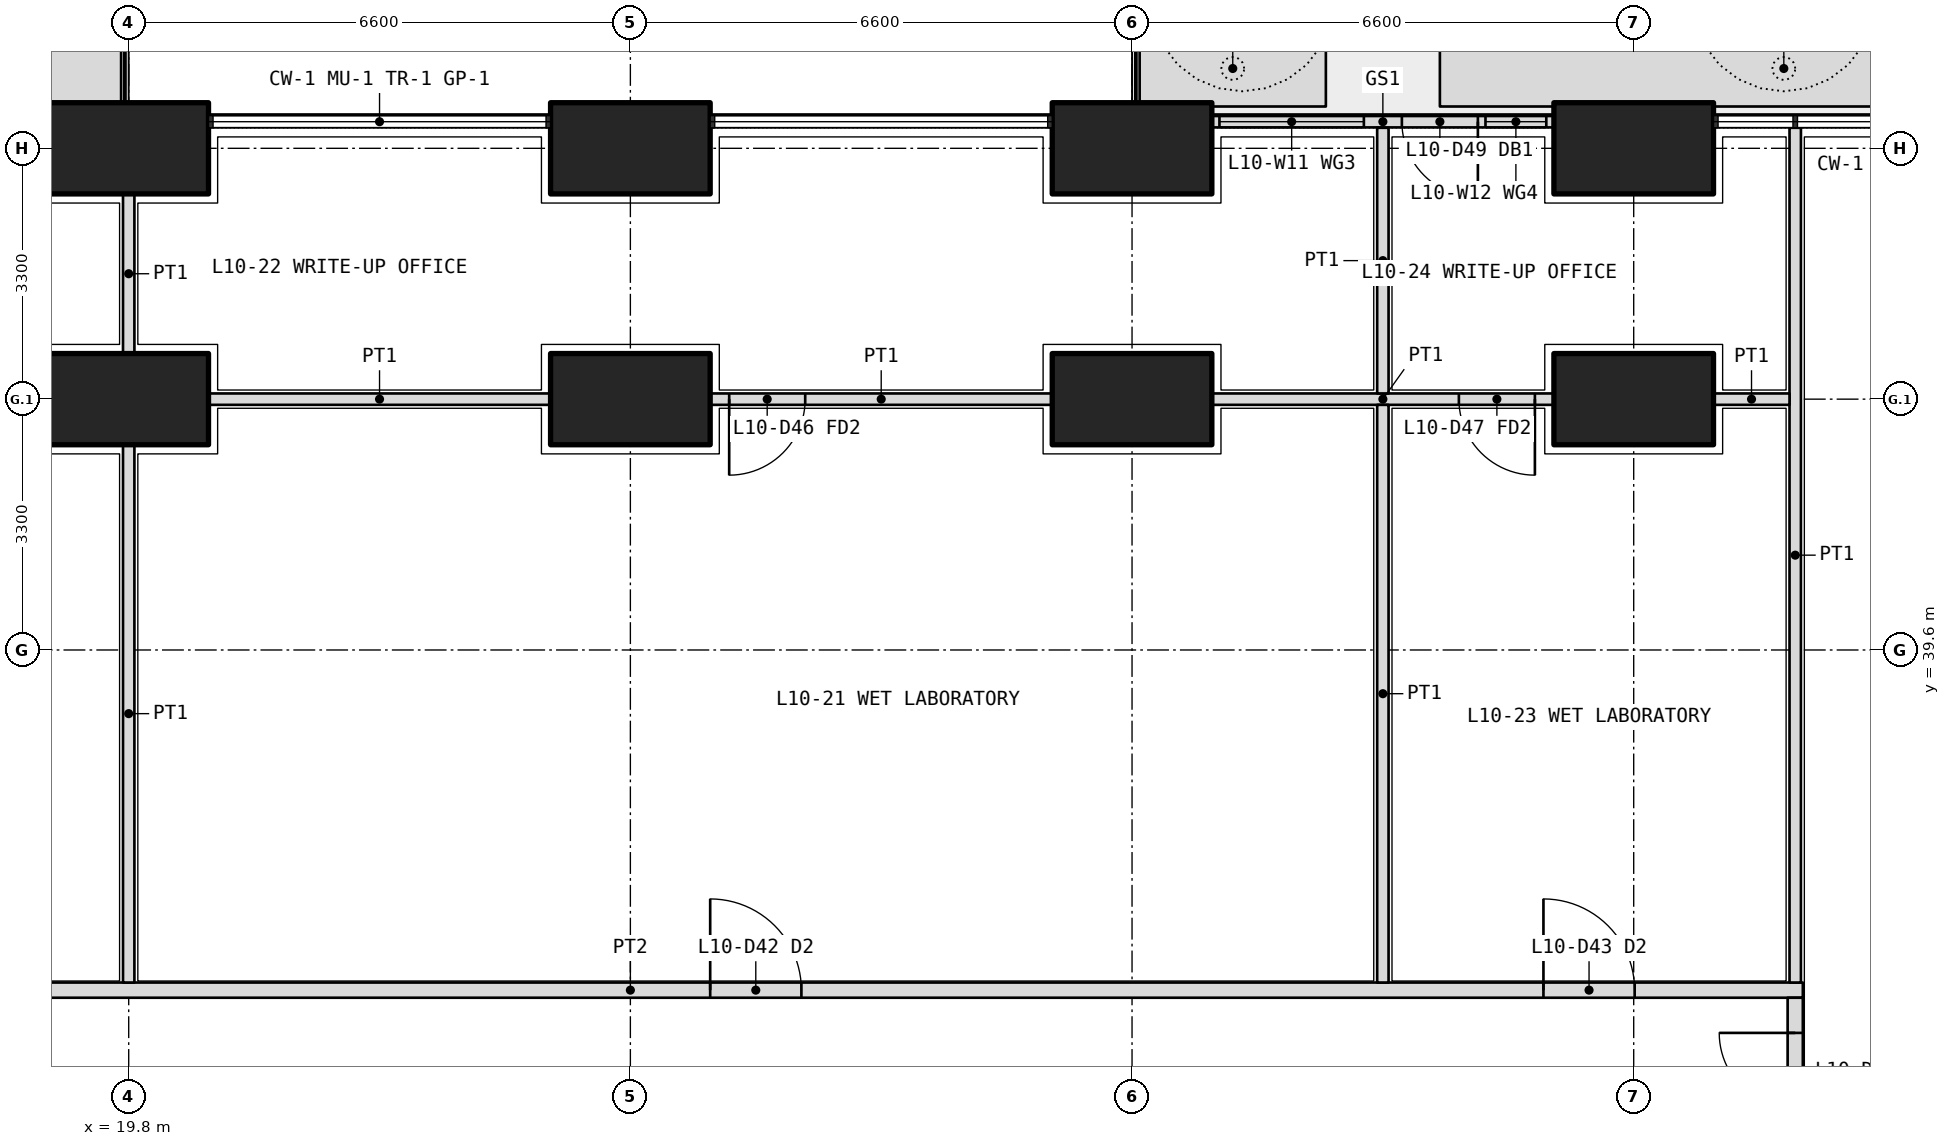
"""IFC4 building model, lengths in metres.
Left out: names, types, materials, properties, quantities, classifications, styles, units other than length and angle.
Written with IfcOpenShell. Run it as: python <this file> out.ifc"""

import sys

from ifc_helpers import new_model, si_unit, direction, frame, frame_2d, origin, origin_2d, place, context, subcontext, project, spatial, polyline, rectangle, outline, extrude, element, fill, save


model = new_model("IFC4")
c1 = context("Model", 3, precision=1e-05, world=origin(), true_north=direction((0.0, 1.0)))
c2 = subcontext(c1, "Body", "Model", "MODEL_VIEW")
j1 = project(units=[si_unit("LENGTHUNIT", "METRE"), si_unit("PLANEANGLEUNIT", "RADIAN")], contexts=[c1])
p1 = place(None, origin())
s1 = spatial("IfcSite", under=j1, at=p1, CompositionType="ELEMENT")
p2 = place(p1, origin())
s2 = spatial("IfcBuilding", under=s1, at=p2, CompositionType="ELEMENT")
p3 = place(p2, frame((0.0, 0.0, 46.5)))
s3 = spatial("IfcBuildingStorey", under=s2, at=p3, CompositionType="ELEMENT", Elevation=46.5)
for number, where, z_axis, x_axis in (
    (1, (19.8, 46.2, 0.0), (0.0, 0.0, 1.0), (1.0, 0.0, 0.0)),
    (2, (26.4, 46.2, 0.0), (0.0, 0.0, 1.0), (1.0, 0.0, 0.0)),
    (3, (33.0, 46.2, 0.0), (0.0, 0.0, 1.0), (1.0, 0.0, 0.0)),
    (4, (39.6, 46.2, 0.0), (0.0, 0.0, 1.0), (1.0, 0.0, 0.0)),
    (5, (19.8, 42.9, 0.0), (0.0, 0.0, 1.0), (1.0, 0.0, 0.0)),
    (6, (26.4, 42.9, 0.0), (0.0, 0.0, 1.0), (1.0, 0.0, 0.0)),
    (7, (33.0, 42.9, 0.0), (0.0, 0.0, 1.0), (1.0, 0.0, 0.0)),
    (8, (39.6, 42.9, 0.0), (0.0, 0.0, 1.0), (1.0, 0.0, 0.0)),
):
    element("IfcColumn", number, at=place(p3, frame(where, z_axis=z_axis, x_axis=x_axis)), inside=s3, PredefinedType="COLUMN", context=c2, shape_type="SweptSolid", body=[
        extrude(rectangle(XDim=2.1, YDim=1.2, at=origin_2d()), origin(), (0.0, 0.0, 1.0), 4.2),
    ])
p4 = place(p3, origin())
e9 = element("IfcWall", 9, at=p4, inside=s3, PredefinedType="USERDEFINED", context=c2, shape_type="SweptSolid", body=[
    extrude(outline(polyline([(10.65, 46.75), (19.7, 46.75), (19.7, 47.75), (10.65, 47.75), (10.65, 46.75)]), holes=[polyline([(10.8, 46.9), (19.55, 46.9), (19.55, 47.6), (10.8, 47.6), (10.8, 46.9)])]), origin(), (0.0, 0.0, 1.0), 1.05),
])
p5 = place(p3, origin())
e10 = element("IfcWall", 10, at=p5, inside=s3, PredefinedType="USERDEFINED", context=c2, shape_type="SweptSolid", body=[
    extrude(outline(polyline([(33.1, 46.75), (35.55, 46.75), (35.55, 47.75), (33.1, 47.75), (33.1, 46.75)]), holes=[polyline([(33.25, 46.9), (35.4, 46.9), (35.4, 47.6), (33.25, 47.6), (33.25, 46.9)])]), origin(), (0.0, 0.0, 1.0), 1.05),
])
p6 = place(p3, origin())
e11 = element("IfcWall", 11, at=p6, inside=s3, PredefinedType="USERDEFINED", context=c2, shape_type="SweptSolid", body=[
    extrude(outline(polyline([(37.05, 46.75), (46.1, 46.75), (46.1, 47.75), (37.05, 47.75), (37.05, 46.75)]), holes=[polyline([(37.2, 46.9), (45.95, 46.9), (45.95, 47.6), (37.2, 47.6), (37.2, 46.9)])]), origin(), (0.0, 0.0, 1.0), 1.05),
])
p7 = place(p3, frame((38.55, 46.55, 0.0), z_axis=(0.0, 0.0, 1.0), x_axis=(-1.0, 0.0, 0.0)))
e12 = element("IfcWall", 12, at=p7, inside=s3, PredefinedType="SOLIDWALL", context=c2, shape_type="SweptSolid", body=[
    extrude(rectangle(XDim=4.5, YDim=0.15, at=frame_2d((2.25, 0.0))), origin(), (0.0, 0.0, 1.0), 2.7),
])
p8 = place(p7, frame((1.0, 0.0, 0.0)))
e13 = element("IfcOpeningElement", 13, at=p8, cuts=e12, PredefinedType="OPENING", context=c2, shape_type="SweptSolid", body=[
    extrude(rectangle(XDim=1.0, YDim=2.4, at=frame_2d((0.5, 1.2))), frame((0.0, 0.085, 0.0), z_axis=(0.0, -1.0, 0.0), x_axis=(1.0, 0.0, 0.0)), (0.0, 0.0, 1.0), 0.17),
])
p9 = place(p7, frame((0.1, 0.0, 0.1)))
e14 = element("IfcOpeningElement", 14, at=p9, cuts=e12, PredefinedType="OPENING", context=c2, shape_type="SweptSolid", body=[
    extrude(rectangle(XDim=0.8, YDim=2.3, at=frame_2d((0.4, 1.15))), frame((0.0, 0.085, 0.0), z_axis=(0.0, -1.0, 0.0), x_axis=(1.0, 0.0, 0.0)), (0.0, 0.0, 1.0), 0.17),
])
p10 = place(p7, frame((2.5, 0.0, 0.1)))
e15 = element("IfcOpeningElement", 15, at=p10, cuts=e12, PredefinedType="OPENING", context=c2, shape_type="SweptSolid", body=[
    extrude(rectangle(XDim=1.9, YDim=2.3, at=frame_2d((0.95, 1.15))), frame((0.0, 0.085, 0.0), z_axis=(0.0, -1.0, 0.0), x_axis=(1.0, 0.0, 0.0)), (0.0, 0.0, 1.0), 0.17),
])
p11 = place(p3, frame((10.975, 35.125, 0.0), z_axis=(0.0, 0.0, 1.0), x_axis=(1.0, 0.0, 0.0)))
e16 = element("IfcWall", 16, at=p11, inside=s3, PredefinedType="PARTITIONING", context=c2, shape_type="SweptSolid", body=[
    extrude(rectangle(XDim=30.85, YDim=0.2, at=frame_2d((15.425, 0.0))), origin(), (0.0, 0.0, 1.0), 2.85),
])
p12 = place(p11, frame((3.962, 0.0, 0.0)))
e17 = element("IfcOpeningElement", 17, at=p12, cuts=e16, PredefinedType="OPENING", context=c2, shape_type="SweptSolid", body=[
    extrude(rectangle(XDim=1.0, YDim=2.1, at=frame_2d((0.5, 1.05))), frame((0.0, 0.11, 0.0), z_axis=(0.0, -1.0, 0.0), x_axis=(1.0, 0.0, 0.0)), (0.0, 0.0, 1.0), 0.22),
])
p13 = place(p11, frame((16.475, 0.0, 0.0)))
e18 = element("IfcOpeningElement", 18, at=p13, cuts=e16, PredefinedType="OPENING", context=c2, shape_type="SweptSolid", body=[
    extrude(rectangle(XDim=1.2, YDim=2.1, at=frame_2d((0.6, 1.05))), frame((0.0, 0.11, 0.0), z_axis=(0.0, -1.0, 0.0), x_axis=(1.0, 0.0, 0.0)), (0.0, 0.0, 1.0), 0.22),
])
p14 = place(p11, frame((27.438, 0.0, 0.0)))
e19 = element("IfcOpeningElement", 19, at=p14, cuts=e16, PredefinedType="OPENING", context=c2, shape_type="SweptSolid", body=[
    extrude(rectangle(XDim=1.2, YDim=2.1, at=frame_2d((0.6, 1.05))), frame((0.0, 0.11, 0.0), z_axis=(0.0, -1.0, 0.0), x_axis=(1.0, 0.0, 0.0)), (0.0, 0.0, 1.0), 0.22),
])
p15 = place(p3, frame((41.725, 11.175, 0.0), z_axis=(0.0, 0.0, 1.0), x_axis=(0.0, 1.0, 0.0)))
e20 = element("IfcWall", 20, at=p15, inside=s3, PredefinedType="PARTITIONING", context=c2, shape_type="SweptSolid", body=[
    extrude(rectangle(XDim=23.85, YDim=0.2, at=frame_2d((11.925, 0.0))), origin(), (0.0, 0.0, 1.0), 2.85),
])
p16 = place(p15, frame((3.762, 0.0, 0.0)))
e21 = element("IfcOpeningElement", 21, at=p16, cuts=e20, PredefinedType="OPENING", context=c2, shape_type="SweptSolid", body=[
    extrude(rectangle(XDim=1.0, YDim=2.1, at=frame_2d((0.5, 1.05))), frame((0.0, 0.11, 0.0), z_axis=(0.0, -1.0, 0.0), x_axis=(1.0, 0.0, 0.0)), (0.0, 0.0, 1.0), 0.22),
])
p17 = place(p15, frame((9.625, 0.0, 0.0)))
e22 = element("IfcOpeningElement", 22, at=p17, cuts=e20, PredefinedType="OPENING", context=c2, shape_type="SweptSolid", body=[
    extrude(rectangle(XDim=1.0, YDim=2.1, at=frame_2d((0.5, 1.05))), frame((0.0, 0.11, 0.0), z_axis=(0.0, -1.0, 0.0), x_axis=(1.0, 0.0, 0.0)), (0.0, 0.0, 1.0), 0.22),
])
p18 = place(p15, frame((12.975, 0.0, 0.0)))
e23 = element("IfcOpeningElement", 23, at=p18, cuts=e20, PredefinedType="OPENING", context=c2, shape_type="SweptSolid", body=[
    extrude(rectangle(XDim=0.9, YDim=2.1, at=frame_2d((0.45, 1.05))), frame((0.0, 0.11, 0.0), z_axis=(0.0, -1.0, 0.0), x_axis=(1.0, 0.0, 0.0)), (0.0, 0.0, 1.0), 0.22),
])
p19 = place(p15, frame((17.925, 0.0, 0.0)))
e24 = element("IfcOpeningElement", 24, at=p19, cuts=e20, PredefinedType="OPENING", context=c2, shape_type="SweptSolid", body=[
    extrude(rectangle(XDim=1.2, YDim=2.1, at=frame_2d((0.6, 1.05))), frame((0.0, 0.11, 0.0), z_axis=(0.0, -1.0, 0.0), x_axis=(1.0, 0.0, 0.0)), (0.0, 0.0, 1.0), 0.22),
])
p20 = place(p15, frame((22.387, 0.0, 0.0)))
e25 = element("IfcOpeningElement", 25, at=p20, cuts=e20, PredefinedType="OPENING", context=c2, shape_type="SweptSolid", body=[
    extrude(rectangle(XDim=1.0, YDim=2.1, at=frame_2d((0.5, 1.05))), frame((0.0, 0.11, 0.0), z_axis=(0.0, -1.0, 0.0), x_axis=(1.0, 0.0, 0.0)), (0.0, 0.0, 1.0), 0.22),
])
p21 = place(p3, frame((41.725, 46.47, 0.0), z_axis=(0.0, 0.0, 1.0), x_axis=(0.0, -1.0, 0.0)))
e26 = element("IfcWall", 26, at=p21, inside=s3, PredefinedType="PARTITIONING", context=c2, shape_type="SweptSolid", body=[
    extrude(rectangle(XDim=11.245, YDim=0.15, at=frame_2d((5.623, 0.0))), origin(), (0.0, 0.0, 1.0), 2.7),
])
p22 = place(p3, frame((41.65, 42.9, 0.0), z_axis=(0.0, 0.0, 1.0), x_axis=(-1.0, 0.0, 0.0)))
e27 = element("IfcWall", 27, at=p22, inside=s3, PredefinedType="PARTITIONING", context=c2, shape_type="SweptSolid", body=[
    extrude(rectangle(XDim=1.0, YDim=0.15, at=frame_2d((0.5, 0.0))), origin(), (0.0, 0.0, 1.0), 3.9),
])
p23 = place(p3, frame((38.55, 42.9, 0.0), z_axis=(0.0, 0.0, 1.0), x_axis=(-1.0, 0.0, 0.0)))
e28 = element("IfcWall", 28, at=p23, inside=s3, PredefinedType="PARTITIONING", context=c2, shape_type="SweptSolid", body=[
    extrude(rectangle(XDim=4.5, YDim=0.15, at=frame_2d((2.25, 0.0))), origin(), (0.0, 0.0, 1.0), 3.9),
])
p24 = place(p23, frame((0.25, 0.0, 0.0)))
e29 = element("IfcOpeningElement", 29, at=p24, cuts=e28, PredefinedType="OPENING", context=c2, shape_type="SweptSolid", body=[
    extrude(rectangle(XDim=1.0, YDim=2.1, at=frame_2d((0.5, 1.05))), frame((0.0, 0.085, 0.0), z_axis=(0.0, -1.0, 0.0), x_axis=(1.0, 0.0, 0.0)), (0.0, 0.0, 1.0), 0.17),
])
p25 = place(p3, frame((31.95, 42.9, 0.0), z_axis=(0.0, 0.0, 1.0), x_axis=(-1.0, 0.0, 0.0)))
e30 = element("IfcWall", 30, at=p25, inside=s3, PredefinedType="PARTITIONING", context=c2, shape_type="SweptSolid", body=[
    extrude(rectangle(XDim=4.5, YDim=0.15, at=frame_2d((2.25, 0.0))), origin(), (0.0, 0.0, 1.0), 3.9),
])
p26 = place(p25, frame((3.25, 0.0, 0.0)))
e31 = element("IfcOpeningElement", 31, at=p26, cuts=e30, PredefinedType="OPENING", context=c2, shape_type="SweptSolid", body=[
    extrude(rectangle(XDim=1.0, YDim=2.1, at=frame_2d((0.5, 1.05))), frame((0.0, 0.085, 0.0), z_axis=(0.0, -1.0, 0.0), x_axis=(1.0, 0.0, 0.0)), (0.0, 0.0, 1.0), 0.17),
])
p27 = place(p3, frame((25.35, 42.9, 0.0), z_axis=(0.0, 0.0, 1.0), x_axis=(-1.0, 0.0, 0.0)))
e32 = element("IfcWall", 32, at=p27, inside=s3, PredefinedType="PARTITIONING", context=c2, shape_type="SweptSolid", body=[
    extrude(rectangle(XDim=4.5, YDim=0.15, at=frame_2d((2.25, 0.0))), origin(), (0.0, 0.0, 1.0), 3.9),
])
p28 = place(p3, frame((19.8, 45.6, 0.0), z_axis=(0.0, 0.0, 1.0), x_axis=(0.0, -1.0, 0.0)))
e33 = element("IfcWall", 33, at=p28, inside=s3, PredefinedType="PARTITIONING", context=c2, shape_type="SweptSolid", body=[
    extrude(rectangle(XDim=2.1, YDim=0.15, at=frame_2d((1.05, 0.0))), origin(), (0.0, 0.0, 1.0), 2.85),
])
p29 = place(p3, frame((19.8, 42.3, 0.0), z_axis=(0.0, 0.0, 1.0), x_axis=(0.0, -1.0, 0.0)))
e34 = element("IfcWall", 34, at=p29, inside=s3, PredefinedType="PARTITIONING", context=c2, shape_type="SweptSolid", body=[
    extrude(rectangle(XDim=7.075, YDim=0.15, at=frame_2d((3.538, 0.0))), origin(), (0.0, 0.0, 1.0), 2.85),
])
p30 = place(p3, frame((36.3, 46.47, 0.0), z_axis=(0.0, 0.0, 1.0), x_axis=(0.0, -1.0, 0.0)))
e35 = element("IfcWall", 35, at=p30, inside=s3, PredefinedType="PARTITIONING", context=c2, shape_type="SweptSolid", body=[
    extrude(rectangle(XDim=3.495, YDim=0.15, at=frame_2d((1.748, 0.0))), origin(), (0.0, 0.0, 1.0), 2.7),
])
p31 = place(p3, frame((36.3, 42.825, 0.0), z_axis=(0.0, 0.0, 1.0), x_axis=(0.0, -1.0, 0.0)))
e36 = element("IfcWall", 36, at=p31, inside=s3, PredefinedType="PARTITIONING", context=c2, shape_type="SweptSolid", body=[
    extrude(rectangle(XDim=7.6, YDim=0.15, at=frame_2d((3.8, 0.0))), origin(), (0.0, 0.0, 1.0), 3.9),
])
p32 = place(p8, origin())
e37 = element("IfcDoor", 37, at=p32, inside=s3, OperationType="SINGLE_SWING_LEFT", PredefinedType="DOOR", context=c2, shape_type="SweptSolid", body=[
    extrude(rectangle(XDim=1.0, YDim=2.4, at=frame_2d((0.5, 1.2))), frame((0.0, 0.025, 0.0), z_axis=(0.0, -1.0, 0.0), x_axis=(1.0, 0.0, 0.0)), (0.0, 0.0, 1.0), 0.05),
])
fill(e13, e37)
p33 = place(p9, origin())
e38 = element("IfcWindow", 38, at=p33, inside=s3, PartitioningType="SINGLE_PANEL", PredefinedType="WINDOW", context=c2, shape_type="SweptSolid", body=[
    extrude(rectangle(XDim=0.8, YDim=2.3, at=frame_2d((0.4, 1.15))), frame((0.0, 0.03, 0.0), z_axis=(0.0, -1.0, 0.0), x_axis=(1.0, 0.0, 0.0)), (0.0, 0.0, 1.0), 0.06),
])
fill(e14, e38)
p34 = place(p10, origin())
e39 = element("IfcWindow", 39, at=p34, inside=s3, PartitioningType="SINGLE_PANEL", PredefinedType="WINDOW", context=c2, shape_type="SweptSolid", body=[
    extrude(rectangle(XDim=1.9, YDim=2.3, at=frame_2d((0.95, 1.15))), frame((0.0, 0.03, 0.0), z_axis=(0.0, -1.0, 0.0), x_axis=(1.0, 0.0, 0.0)), (0.0, 0.0, 1.0), 0.06),
])
fill(e15, e39)
p35 = place(p20, origin())
e40 = element("IfcDoor", 40, at=p35, inside=s3, OperationType="SINGLE_SWING_RIGHT", PredefinedType="DOOR", context=c2, shape_type="SweptSolid", body=[
    extrude(rectangle(XDim=1.0, YDim=2.1, at=frame_2d((0.5, 1.05))), frame((0.0, 0.025, 0.0), z_axis=(0.0, -1.0, 0.0), x_axis=(1.0, 0.0, 0.0)), (0.0, 0.0, 1.0), 0.05),
])
fill(e25, e40)
p36 = place(p13, origin())
e41 = element("IfcDoor", 41, at=p36, inside=s3, OperationType="DOUBLE_DOOR_SINGLE_SWING", PredefinedType="DOOR", context=c2, shape_type="SweptSolid", body=[
    extrude(rectangle(XDim=1.2, YDim=2.1, at=frame_2d((0.6, 1.05))), frame((0.0, 0.025, 0.0), z_axis=(0.0, -1.0, 0.0), x_axis=(1.0, 0.0, 0.0)), (0.0, 0.0, 1.0), 0.05),
])
fill(e18, e41)
p37 = place(p26, origin())
e42 = element("IfcDoor", 42, at=p37, inside=s3, OperationType="SINGLE_SWING_RIGHT", PredefinedType="DOOR", context=c2, shape_type="SweptSolid", body=[
    extrude(rectangle(XDim=1.0, YDim=2.1, at=frame_2d((0.5, 1.05))), frame((0.0, 0.025, 0.0), z_axis=(0.0, -1.0, 0.0), x_axis=(1.0, 0.0, 0.0)), (0.0, 0.0, 1.0), 0.05),
])
fill(e31, e42)
p38 = place(p14, origin())
e43 = element("IfcDoor", 43, at=p38, inside=s3, OperationType="DOUBLE_DOOR_SINGLE_SWING", PredefinedType="DOOR", context=c2, shape_type="SweptSolid", body=[
    extrude(rectangle(XDim=1.2, YDim=2.1, at=frame_2d((0.6, 1.05))), frame((0.0, 0.025, 0.0), z_axis=(0.0, -1.0, 0.0), x_axis=(1.0, 0.0, 0.0)), (0.0, 0.0, 1.0), 0.05),
])
fill(e19, e43)
p39 = place(p24, origin())
e44 = element("IfcDoor", 44, at=p39, inside=s3, OperationType="SINGLE_SWING_LEFT", PredefinedType="DOOR", context=c2, shape_type="SweptSolid", body=[
    extrude(rectangle(XDim=1.0, YDim=2.1, at=frame_2d((0.5, 1.05))), frame((0.0, 0.025, 0.0), z_axis=(0.0, -1.0, 0.0), x_axis=(1.0, 0.0, 0.0)), (0.0, 0.0, 1.0), 0.05),
])
fill(e29, e44)
save(model, sys.argv[1])
